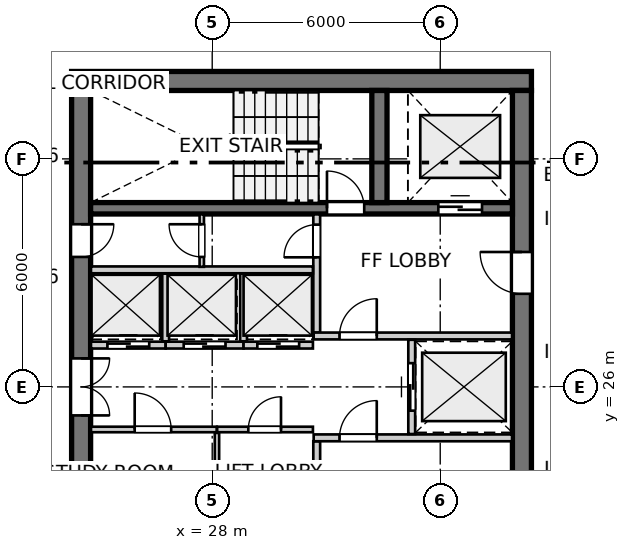
"""IFC4 building model, lengths in metres.
Left out: names, types, materials, properties, quantities, classifications, styles, units other than length and angle.
Written with IfcOpenShell. Run it as: python <this file> out.ifc"""

import sys

from ifc_helpers import new_model, si_unit, direction, frame, frame_2d, origin, place, context, subcontext, project, spatial, rectangle, extrude, source, transform, mapped, element, fill, save


model = new_model("IFC4")
c1 = context("Model", 3, precision=1e-05, world=origin(), true_north=direction((0.0, 1.0)))
c2 = subcontext(c1, "Body", "Model", "MODEL_VIEW")
j1 = project(units=[si_unit("LENGTHUNIT", "METRE"), si_unit("PLANEANGLEUNIT", "RADIAN")], contexts=[c1])
p1 = place(None, origin())
s1 = spatial("IfcSite", under=j1, at=p1, CompositionType="ELEMENT")
p2 = place(p1, origin())
s2 = spatial("IfcBuilding", under=s1, at=p2, CompositionType="ELEMENT")
p3 = place(p2, frame((0.0, 0.0, 211.6)))
s3 = spatial("IfcBuildingStorey", under=s2, at=p3, CompositionType="ELEMENT", Elevation=211.6)
p4 = place(p3, frame((36.4, 34.05, 0.0), z_axis=(0.0, 0.0, 1.0), x_axis=(-1.0, 0.0, 0.0)))
e1 = element("IfcWall", 1, at=p4, inside=s3, PredefinedType="SHEAR", context=c2, shape_type="SweptSolid", body=[
    extrude(rectangle(XDim=12.1, YDim=0.5, at=frame_2d((6.05, 0.0))), origin(), (0.0, 0.0, 1.0), 2.96),
])
p5 = place(p3, frame((24.55, 33.8, 0.0), z_axis=(0.0, 0.0, 1.0), x_axis=(0.0, -1.0, 0.0)))
e2 = element("IfcWall", 2, at=p5, inside=s3, PredefinedType="SHEAR", context=c2, shape_type="SweptSolid", body=[
    extrude(rectangle(XDim=15.6, YDim=0.5, at=frame_2d((7.8, 0.0))), origin(), (0.0, 0.0, 1.0), 2.96),
])
p6 = place(p5, frame((7.05, 0.0, 0.0)))
e3 = element("IfcOpeningElement", 3, at=p6, cuts=e2, PredefinedType="OPENING", context=c2, shape_type="SweptSolid", body=[
    extrude(rectangle(XDim=1.5, YDim=2.15, at=frame_2d((0.75, 1.075))), frame((0.0, 0.26, 0.0), z_axis=(0.0, -1.0, 0.0), x_axis=(1.0, 0.0, 0.0)), (0.0, 0.0, 1.0), 0.52),
])
p7 = place(p5, frame((3.52, 0.0, 0.0)))
e4 = element("IfcOpeningElement", 4, at=p7, cuts=e2, PredefinedType="OPENING", context=c2, shape_type="SweptSolid", body=[
    extrude(rectangle(XDim=0.86, YDim=2.05, at=frame_2d((0.43, 1.025))), frame((0.0, 0.26, 0.0), z_axis=(0.0, -1.0, 0.0), x_axis=(1.0, 0.0, 0.0)), (0.0, 0.0, 1.0), 0.52),
])
p8 = place(p5, frame((11.22, 0.0, 0.0)))
e5 = element("IfcOpeningElement", 5, at=p8, cuts=e2, PredefinedType="OPENING", context=c2, shape_type="SweptSolid", body=[
    extrude(rectangle(XDim=0.86, YDim=2.05, at=frame_2d((0.43, 1.025))), frame((0.0, 0.26, 0.0), z_axis=(0.0, -1.0, 0.0), x_axis=(1.0, 0.0, 0.0)), (0.0, 0.0, 1.0), 0.52),
])
p9 = place(p3, frame((36.15, 18.2, 0.0), z_axis=(0.0, 0.0, 1.0), x_axis=(0.0, 1.0, 0.0)))
e6 = element("IfcWall", 6, at=p9, inside=s3, PredefinedType="SHEAR", context=c2, shape_type="SweptSolid", body=[
    extrude(rectangle(XDim=15.6, YDim=0.5, at=frame_2d((7.8, 0.0))), origin(), (0.0, 0.0, 1.0), 2.96),
])
p10 = place(p9, frame((4.25, 0.0, 0.0)))
e7 = element("IfcOpeningElement", 7, at=p10, cuts=e6, PredefinedType="OPENING", context=c2, shape_type="SweptSolid", body=[
    extrude(rectangle(XDim=1.1, YDim=2.15, at=frame_2d((0.55, 1.075))), frame((0.0, 0.26, 0.0), z_axis=(0.0, -1.0, 0.0), x_axis=(1.0, 0.0, 0.0)), (0.0, 0.0, 1.0), 0.52),
])
p11 = place(p9, frame((10.25, 0.0, 0.0)))
e8 = element("IfcOpeningElement", 8, at=p11, cuts=e6, PredefinedType="OPENING", context=c2, shape_type="SweptSolid", body=[
    extrude(rectangle(XDim=1.1, YDim=2.15, at=frame_2d((0.55, 1.075))), frame((0.0, 0.26, 0.0), z_axis=(0.0, -1.0, 0.0), x_axis=(1.0, 0.0, 0.0)), (0.0, 0.0, 1.0), 0.52),
])
p12 = place(p3, frame((24.8, 30.7, 0.0), z_axis=(0.0, 0.0, 1.0), x_axis=(1.0, 0.0, 0.0)))
e9 = element("IfcWall", 9, at=p12, inside=s3, PredefinedType="SHEAR", context=c2, shape_type="SweptSolid", body=[
    extrude(rectangle(XDim=11.1, YDim=0.3, at=frame_2d((5.55, 0.0))), origin(), (0.0, 0.0, 1.0), 2.96),
])
p13 = place(p12, frame((6.22, 0.0, 0.0)))
e10 = element("IfcOpeningElement", 10, at=p13, cuts=e9, PredefinedType="OPENING", context=c2, shape_type="SweptSolid", body=[
    extrude(rectangle(XDim=0.98, YDim=2.15, at=frame_2d((0.49, 1.075))), frame((0.0, 0.16, 0.0), z_axis=(0.0, -1.0, 0.0), x_axis=(1.0, 0.0, 0.0)), (0.0, 0.0, 1.0), 0.32),
])
p14 = place(p12, frame((9.15, 0.0, 0.0)))
e11 = element("IfcOpeningElement", 11, at=p14, cuts=e9, PredefinedType="OPENING", context=c2, shape_type="SweptSolid", body=[
    extrude(rectangle(XDim=1.15, YDim=2.15, at=frame_2d((0.575, 1.075))), frame((0.0, 0.16, 0.0), z_axis=(0.0, -1.0, 0.0), x_axis=(1.0, 0.0, 0.0)), (0.0, 0.0, 1.0), 0.32),
])
p15 = place(p3, frame((32.4, 30.85, 0.0), z_axis=(0.0, 0.0, 1.0), x_axis=(0.0, 1.0, 0.0)))
e12 = element("IfcWall", 12, at=p15, inside=s3, PredefinedType="SHEAR", context=c2, shape_type="SweptSolid", body=[
    extrude(rectangle(XDim=2.95, YDim=0.4, at=frame_2d((1.475, 0.0))), origin(), (0.0, 0.0, 1.0), 2.96),
])
p16 = place(p3, frame((30.75, 21.46, 0.0), z_axis=(0.0, 0.0, 1.0), x_axis=(0.0, 1.0, 0.0)))
e13 = element("IfcWall", 13, at=p16, inside=s3, PredefinedType="PARTITIONING", context=c2, shape_type="SweptSolid", body=[
    extrude(rectangle(XDim=3.11, YDim=0.18, at=frame_2d((1.555, 0.0))), origin(), (0.0, 0.0, 1.0), 2.96),
])
p17 = place(p16, frame((0.26, 0.0, 0.0)))
e14 = element("IfcOpeningElement", 14, at=p17, cuts=e13, PredefinedType="OPENING", context=c2, shape_type="SweptSolid", body=[
    extrude(rectangle(XDim=0.86, YDim=2.05, at=frame_2d((0.43, 1.025))), frame((0.0, 0.1, 0.0), z_axis=(0.0, -1.0, 0.0), x_axis=(1.0, 0.0, 0.0)), (0.0, 0.0, 1.0), 0.2),
])
p18 = place(p3, frame((30.67, 24.66, 0.0), z_axis=(0.0, 0.0, 1.0), x_axis=(1.0, 0.0, 0.0)))
e15 = element("IfcWall", 15, at=p18, inside=s3, PredefinedType="PARTITIONING", context=c2, shape_type="SweptSolid", body=[
    extrude(rectangle(XDim=5.22, YDim=0.18, at=frame_2d((2.61, 0.0))), origin(), (0.0, 0.0, 1.0), 2.96),
])
p19 = place(p18, frame((0.68, 0.0, 0.0)))
e16 = element("IfcOpeningElement", 16, at=p19, cuts=e15, PredefinedType="OPENING", context=c2, shape_type="SweptSolid", body=[
    extrude(rectangle(XDim=0.98, YDim=2.15, at=frame_2d((0.49, 1.075))), frame((0.0, 0.1, 0.0), z_axis=(0.0, -1.0, 0.0), x_axis=(1.0, 0.0, 0.0)), (0.0, 0.0, 1.0), 0.2),
])
p20 = place(p3, frame((30.75, 27.43, 0.0), z_axis=(0.0, 0.0, 1.0), x_axis=(0.0, 1.0, 0.0)))
e17 = element("IfcWall", 17, at=p20, inside=s3, PredefinedType="PARTITIONING", context=c2, shape_type="SweptSolid", body=[
    extrude(rectangle(XDim=3.11, YDim=0.18, at=frame_2d((1.555, 0.0))), origin(), (0.0, 0.0, 1.0), 2.96),
])
p21 = place(p20, frame((1.98, 0.0, 0.0)))
e18 = element("IfcOpeningElement", 18, at=p21, cuts=e17, PredefinedType="OPENING", context=c2, shape_type="SweptSolid", body=[
    extrude(rectangle(XDim=0.86, YDim=2.05, at=frame_2d((0.43, 1.025))), frame((0.0, 0.1, 0.0), z_axis=(0.0, -1.0, 0.0), x_axis=(1.0, 0.0, 0.0)), (0.0, 0.0, 1.0), 0.2),
])
p22 = place(p3, frame((30.67, 27.34, 0.0), z_axis=(0.0, 0.0, 1.0), x_axis=(1.0, 0.0, 0.0)))
e19 = element("IfcWall", 19, at=p22, inside=s3, PredefinedType="PARTITIONING", context=c2, shape_type="SweptSolid", body=[
    extrude(rectangle(XDim=5.22, YDim=0.18, at=frame_2d((2.61, 0.0))), origin(), (0.0, 0.0, 1.0), 2.96),
])
p23 = place(p22, frame((0.68, 0.0, 0.0)))
e20 = element("IfcOpeningElement", 20, at=p23, cuts=e19, PredefinedType="OPENING", context=c2, shape_type="SweptSolid", body=[
    extrude(rectangle(XDim=0.98, YDim=2.15, at=frame_2d((0.49, 1.075))), frame((0.0, 0.1, 0.0), z_axis=(0.0, -1.0, 0.0), x_axis=(1.0, 0.0, 0.0)), (0.0, 0.0, 1.0), 0.2),
])
p24 = place(p3, frame((33.25, 24.76, 0.0), z_axis=(0.0, 0.0, 1.0), x_axis=(0.0, 1.0, 0.0)))
e21 = element("IfcWall", 21, at=p24, inside=s3, PredefinedType="PARTITIONING", context=c2, shape_type="SweptSolid", body=[
    extrude(rectangle(XDim=2.48, YDim=0.18, at=frame_2d((1.24, 0.0))), origin(), (0.0, 0.0, 1.0), 2.96),
])
p25 = place(p24, frame((0.615, 0.0, 0.0)))
e22 = element("IfcOpeningElement", 22, at=p25, cuts=e21, PredefinedType="OPENING", context=c2, shape_type="SweptSolid", body=[
    extrude(rectangle(XDim=1.25, YDim=2.15, at=frame_2d((0.625, 1.075))), frame((0.0, 0.1, 0.0), z_axis=(0.0, -1.0, 0.0), x_axis=(1.0, 0.0, 0.0)), (0.0, 0.0, 1.0), 0.2),
])
p26 = place(p3, frame((24.81, 24.88, 0.0), z_axis=(0.0, 0.0, 1.0), x_axis=(1.0, 0.0, 0.0)))
e23 = element("IfcWall", 23, at=p26, inside=s3, PredefinedType="PARTITIONING", context=c2, shape_type="SweptSolid", body=[
    extrude(rectangle(XDim=3.31, YDim=0.145, at=frame_2d((1.655, 0.0))), origin(), (0.0, 0.0, 1.0), 2.96),
])
p27 = place(p26, frame((1.15, 0.0, 0.0)))
e24 = element("IfcOpeningElement", 24, at=p27, cuts=e23, PredefinedType="OPENING", context=c2, shape_type="SweptSolid", body=[
    extrude(rectangle(XDim=0.96, YDim=2.1, at=frame_2d((0.48, 1.05))), frame((0.0, 0.083, 0.0), z_axis=(0.0, -1.0, 0.0), x_axis=(1.0, 0.0, 0.0)), (0.0, 0.0, 1.0), 0.165),
])
p28 = place(p3, frame((28.13, 24.88, 0.0), z_axis=(0.0, 0.0, 1.0), x_axis=(1.0, 0.0, 0.0)))
e25 = element("IfcWall", 25, at=p28, inside=s3, PredefinedType="PARTITIONING", context=c2, shape_type="SweptSolid", body=[
    extrude(rectangle(XDim=2.52, YDim=0.145, at=frame_2d((1.26, 0.0))), origin(), (0.0, 0.0, 1.0), 2.96),
])
p29 = place(p28, frame((0.82, 0.0, 0.0)))
e26 = element("IfcOpeningElement", 26, at=p29, cuts=e25, PredefinedType="OPENING", context=c2, shape_type="SweptSolid", body=[
    extrude(rectangle(XDim=0.86, YDim=2.05, at=frame_2d((0.43, 1.025))), frame((0.0, 0.083, 0.0), z_axis=(0.0, -1.0, 0.0), x_axis=(1.0, 0.0, 0.0)), (0.0, 0.0, 1.0), 0.165),
])
p30 = place(p3, frame((28.125, 23.02, 0.0), z_axis=(0.0, 0.0, 1.0), x_axis=(0.0, 1.0, 0.0)))
e27 = element("IfcWall", 27, at=p30, inside=s3, PredefinedType="PARTITIONING", context=c2, shape_type="SweptSolid", body=[
    extrude(rectangle(XDim=1.77, YDim=0.115, at=frame_2d((0.885, 0.0))), origin(), (0.0, 0.0, 1.0), 2.96),
])
p31 = place(p3, frame((24.81, 29.08, 0.0), z_axis=(0.0, 0.0, 1.0), x_axis=(1.0, 0.0, 0.0)))
e28 = element("IfcWall", 28, at=p31, inside=s3, PredefinedType="PARTITIONING", context=c2, shape_type="SweptSolid", body=[
    extrude(rectangle(XDim=5.84, YDim=0.18, at=frame_2d((2.92, 0.0))), origin(), (0.0, 0.0, 1.0), 2.96),
])
p32 = place(p3, frame((24.81, 27.1, 0.0), z_axis=(0.0, 0.0, 1.0), x_axis=(1.0, 0.0, 0.0)))
e29 = element("IfcWall", 29, at=p32, inside=s3, PredefinedType="PARTITIONING", context=c2, shape_type="SweptSolid", body=[
    extrude(rectangle(XDim=1.965, YDim=0.18, at=frame_2d((0.982, 0.0))), origin(), (0.0, 0.0, 1.0), 2.96),
])
p33 = place(p32, frame((0.433, 0.0, 0.0)))
e30 = element("IfcOpeningElement", 30, at=p33, cuts=e29, PredefinedType="OPENING", context=c2, shape_type="SweptSolid", body=[
    extrude(rectangle(XDim=1.1, YDim=2.15, at=frame_2d((0.55, 1.075))), frame((0.0, 0.1, 0.0), z_axis=(0.0, -1.0, 0.0), x_axis=(1.0, 0.0, 0.0)), (0.0, 0.0, 1.0), 0.2),
])
p34 = place(p3, frame((26.775, 27.1, 0.0), z_axis=(0.0, 0.0, 1.0), x_axis=(1.0, 0.0, 0.0)))
e31 = element("IfcWall", 31, at=p34, inside=s3, PredefinedType="PARTITIONING", context=c2, shape_type="SweptSolid", body=[
    extrude(rectangle(XDim=2.05, YDim=0.18, at=frame_2d((1.025, 0.0))), origin(), (0.0, 0.0, 1.0), 2.96),
])
p35 = place(p34, frame((0.475, 0.0, 0.0)))
e32 = element("IfcOpeningElement", 32, at=p35, cuts=e31, PredefinedType="OPENING", context=c2, shape_type="SweptSolid", body=[
    extrude(rectangle(XDim=1.1, YDim=2.15, at=frame_2d((0.55, 1.075))), frame((0.0, 0.1, 0.0), z_axis=(0.0, -1.0, 0.0), x_axis=(1.0, 0.0, 0.0)), (0.0, 0.0, 1.0), 0.2),
])
p36 = place(p3, frame((26.775, 27.2, 0.0), z_axis=(0.0, 0.0, 1.0), x_axis=(0.0, 1.0, 0.0)))
e33 = element("IfcWall", 33, at=p36, inside=s3, PredefinedType="PARTITIONING", context=c2, shape_type="SweptSolid", body=[
    extrude(rectangle(XDim=1.78, YDim=0.18, at=frame_2d((0.89, 0.0))), origin(), (0.0, 0.0, 1.0), 2.96),
])
p37 = place(p3, frame((28.825, 27.1, 0.0), z_axis=(0.0, 0.0, 1.0), x_axis=(1.0, 0.0, 0.0)))
e34 = element("IfcWall", 34, at=p37, inside=s3, PredefinedType="PARTITIONING", context=c2, shape_type="SweptSolid", body=[
    extrude(rectangle(XDim=1.825, YDim=0.18, at=frame_2d((0.913, 0.0))), origin(), (0.0, 0.0, 1.0), 2.96),
])
p38 = place(p37, frame((0.363, 0.0, 0.0)))
e35 = element("IfcOpeningElement", 35, at=p38, cuts=e34, PredefinedType="OPENING", context=c2, shape_type="SweptSolid", body=[
    extrude(rectangle(XDim=1.1, YDim=2.15, at=frame_2d((0.55, 1.075))), frame((0.0, 0.1, 0.0), z_axis=(0.0, -1.0, 0.0), x_axis=(1.0, 0.0, 0.0)), (0.0, 0.0, 1.0), 0.2),
])
p39 = place(p3, frame((28.825, 27.2, 0.0), z_axis=(0.0, 0.0, 1.0), x_axis=(0.0, 1.0, 0.0)))
e36 = element("IfcWall", 36, at=p39, inside=s3, PredefinedType="PARTITIONING", context=c2, shape_type="SweptSolid", body=[
    extrude(rectangle(XDim=1.78, YDim=0.18, at=frame_2d((0.89, 0.0))), origin(), (0.0, 0.0, 1.0), 2.96),
])
p40 = place(p3, frame((27.725, 29.16, 0.0), z_axis=(0.0, 0.0, 1.0), x_axis=(0.0, 1.0, 0.0)))
e37 = element("IfcWall", 37, at=p40, inside=s3, PredefinedType="PARTITIONING", context=c2, shape_type="SweptSolid", body=[
    extrude(rectangle(XDim=1.38, YDim=0.115, at=frame_2d((0.69, 0.0))), origin(), (0.0, 0.0, 1.0), 2.96),
])
p41 = place(p40, frame((0.26, 0.0, 0.0)))
e38 = element("IfcOpeningElement", 38, at=p41, cuts=e37, PredefinedType="OPENING", context=c2, shape_type="SweptSolid", body=[
    extrude(rectangle(XDim=0.86, YDim=2.05, at=frame_2d((0.43, 1.025))), frame((0.0, 0.067, 0.0), z_axis=(0.0, -1.0, 0.0), x_axis=(1.0, 0.0, 0.0)), (0.0, 0.0, 1.0), 0.135),
])
m1 = source(origin(), c2, "Body", "SweptSolid", [
    extrude(rectangle(XDim=0.98, YDim=2.15, at=frame_2d((0.49, 1.075))), frame((0.0, 0.025, 0.0), z_axis=(0.0, -1.0, 0.0), x_axis=(1.0, 0.0, 0.0)), (0.0, 0.0, 1.0), 0.05),
])
p42 = place(p13, origin())
e39 = element("IfcDoor", 39, at=p42, inside=s3, OperationType="SINGLE_SWING_LEFT", PredefinedType="DOOR", context=c2, shape_type="MappedRepresentation", body=[
    mapped(m1, transform((0.0, 0.0, 0.0), x_axis=(1.0, 0.0, 0.0), y_axis=(0.0, 1.0, 0.0), z_axis=(0.0, 0.0, 1.0), scale=1.0)),
])
fill(e10, e39)
m2 = source(origin(), c2, "Body", "SweptSolid", [
    extrude(rectangle(XDim=1.15, YDim=2.15, at=frame_2d((0.575, 1.075))), frame((0.0, 0.025, 0.0), z_axis=(0.0, -1.0, 0.0), x_axis=(1.0, 0.0, 0.0)), (0.0, 0.0, 1.0), 0.05),
])
p43 = place(p14, origin())
e40 = element("IfcDoor", 40, at=p43, inside=s3, OperationType="DOUBLE_DOOR_SLIDING", PredefinedType="DOOR", context=c2, shape_type="MappedRepresentation", body=[
    mapped(m2, transform((0.0, 0.0, 0.0), x_axis=(1.0, 0.0, 0.0), y_axis=(0.0, 1.0, 0.0), z_axis=(0.0, 0.0, 1.0), scale=1.0)),
])
fill(e11, e40)
m3 = source(origin(), c2, "Body", "SweptSolid", [
    extrude(rectangle(XDim=1.1, YDim=2.15, at=frame_2d((0.55, 1.075))), frame((0.0, 0.025, 0.0), z_axis=(0.0, -1.0, 0.0), x_axis=(1.0, 0.0, 0.0)), (0.0, 0.0, 1.0), 0.05),
])
p44 = place(p11, origin())
e41 = element("IfcDoor", 41, at=p44, inside=s3, OperationType="SINGLE_SWING_RIGHT", PredefinedType="DOOR", context=c2, shape_type="MappedRepresentation", body=[
    mapped(m3, transform((0.0, 0.0, 0.0), x_axis=(1.0, 0.0, 0.0), y_axis=(0.0, 1.0, 0.0), z_axis=(0.0, 0.0, 1.0), scale=1.0)),
])
fill(e8, e41)
m4 = source(origin(), c2, "Body", "SweptSolid", [
    extrude(rectangle(XDim=1.5, YDim=2.15, at=frame_2d((0.75, 1.075))), frame((0.0, 0.025, 0.0), z_axis=(0.0, -1.0, 0.0), x_axis=(1.0, 0.0, 0.0)), (0.0, 0.0, 1.0), 0.05),
])
p45 = place(p6, origin())
e42 = element("IfcDoor", 42, at=p45, inside=s3, OperationType="DOUBLE_DOOR_SINGLE_SWING", PredefinedType="DOOR", context=c2, shape_type="MappedRepresentation", body=[
    mapped(m4, transform((0.0, 0.0, 0.0), x_axis=(1.0, 0.0, 0.0), y_axis=(0.0, 1.0, 0.0), z_axis=(0.0, 0.0, 1.0), scale=1.0)),
])
fill(e3, e42)
m5 = source(origin(), c2, "Body", "SweptSolid", [
    extrude(rectangle(XDim=0.86, YDim=2.05, at=frame_2d((0.43, 1.025))), frame((0.0, 0.025, 0.0), z_axis=(0.0, -1.0, 0.0), x_axis=(1.0, 0.0, 0.0)), (0.0, 0.0, 1.0), 0.05),
])
p46 = place(p7, origin())
e43 = element("IfcDoor", 43, at=p46, inside=s3, OperationType="SINGLE_SWING_LEFT", PredefinedType="DOOR", context=c2, shape_type="MappedRepresentation", body=[
    mapped(m5, transform((0.0, 0.0, 0.0), x_axis=(1.0, 0.0, 0.0), y_axis=(0.0, 1.0, 0.0), z_axis=(0.0, 0.0, 1.0), scale=1.0)),
])
fill(e4, e43)
p47 = place(p19, origin())
e44 = element("IfcDoor", 44, at=p47, inside=s3, OperationType="SINGLE_SWING_RIGHT", PredefinedType="DOOR", context=c2, shape_type="MappedRepresentation", body=[
    mapped(m1, transform((0.0, 0.0, 0.0), x_axis=(1.0, 0.0, 0.0), y_axis=(0.0, 1.0, 0.0), z_axis=(0.0, 0.0, 1.0), scale=1.0)),
])
fill(e16, e44)
p48 = place(p21, origin())
e45 = element("IfcDoor", 45, at=p48, inside=s3, OperationType="SINGLE_SWING_LEFT", PredefinedType="DOOR", context=c2, shape_type="MappedRepresentation", body=[
    mapped(m5, transform((0.0, 0.0, 0.0), x_axis=(1.0, 0.0, 0.0), y_axis=(0.0, 1.0, 0.0), z_axis=(0.0, 0.0, 1.0), scale=1.0)),
])
fill(e18, e45)
p49 = place(p23, origin())
e46 = element("IfcDoor", 46, at=p49, inside=s3, OperationType="SINGLE_SWING_RIGHT", PredefinedType="DOOR", context=c2, shape_type="MappedRepresentation", body=[
    mapped(m1, transform((0.0, 0.0, 0.0), x_axis=(1.0, 0.0, 0.0), y_axis=(0.0, 1.0, 0.0), z_axis=(0.0, 0.0, 1.0), scale=1.0)),
])
fill(e20, e46)
m6 = source(origin(), c2, "Body", "SweptSolid", [
    extrude(rectangle(XDim=1.25, YDim=2.15, at=frame_2d((0.625, 1.075))), frame((0.0, 0.025, 0.0), z_axis=(0.0, -1.0, 0.0), x_axis=(1.0, 0.0, 0.0)), (0.0, 0.0, 1.0), 0.05),
])
p50 = place(p25, origin())
e47 = element("IfcDoor", 47, at=p50, inside=s3, OperationType="DOUBLE_DOOR_SLIDING", PredefinedType="DOOR", context=c2, shape_type="MappedRepresentation", body=[
    mapped(m6, transform((0.0, 0.0, 0.0), x_axis=(1.0, 0.0, 0.0), y_axis=(0.0, 1.0, 0.0), z_axis=(0.0, 0.0, 1.0), scale=1.0)),
])
fill(e22, e47)
m7 = source(origin(), c2, "Body", "SweptSolid", [
    extrude(rectangle(XDim=0.96, YDim=2.1, at=frame_2d((0.48, 1.05))), frame((0.0, 0.025, 0.0), z_axis=(0.0, -1.0, 0.0), x_axis=(1.0, 0.0, 0.0)), (0.0, 0.0, 1.0), 0.05),
])
p51 = place(p27, origin())
e48 = element("IfcDoor", 48, at=p51, inside=s3, OperationType="SINGLE_SWING_LEFT", PredefinedType="DOOR", context=c2, shape_type="MappedRepresentation", body=[
    mapped(m7, transform((0.0, 0.0, 0.0), x_axis=(1.0, 0.0, 0.0), y_axis=(0.0, 1.0, 0.0), z_axis=(0.0, 0.0, 1.0), scale=1.0)),
])
fill(e24, e48)
p52 = place(p29, origin())
e49 = element("IfcDoor", 49, at=p52, inside=s3, OperationType="SINGLE_SWING_RIGHT", PredefinedType="DOOR", context=c2, shape_type="MappedRepresentation", body=[
    mapped(m5, transform((0.0, 0.0, 0.0), x_axis=(1.0, 0.0, 0.0), y_axis=(0.0, 1.0, 0.0), z_axis=(0.0, 0.0, 1.0), scale=1.0)),
])
fill(e26, e49)
p53 = place(p33, origin())
e50 = element("IfcDoor", 50, at=p53, inside=s3, OperationType="DOUBLE_DOOR_SLIDING", PredefinedType="DOOR", context=c2, shape_type="MappedRepresentation", body=[
    mapped(m3, transform((0.0, 0.0, 0.0), x_axis=(1.0, 0.0, 0.0), y_axis=(0.0, 1.0, 0.0), z_axis=(0.0, 0.0, 1.0), scale=1.0)),
])
fill(e30, e50)
p54 = place(p35, origin())
e51 = element("IfcDoor", 51, at=p54, inside=s3, OperationType="DOUBLE_DOOR_SLIDING", PredefinedType="DOOR", context=c2, shape_type="MappedRepresentation", body=[
    mapped(m3, transform((0.0, 0.0, 0.0), x_axis=(1.0, 0.0, 0.0), y_axis=(0.0, 1.0, 0.0), z_axis=(0.0, 0.0, 1.0), scale=1.0)),
])
fill(e32, e51)
p55 = place(p38, origin())
e52 = element("IfcDoor", 52, at=p55, inside=s3, OperationType="DOUBLE_DOOR_SLIDING", PredefinedType="DOOR", context=c2, shape_type="MappedRepresentation", body=[
    mapped(m3, transform((0.0, 0.0, 0.0), x_axis=(1.0, 0.0, 0.0), y_axis=(0.0, 1.0, 0.0), z_axis=(0.0, 0.0, 1.0), scale=1.0)),
])
fill(e35, e52)
p56 = place(p41, origin())
e53 = element("IfcDoor", 53, at=p56, inside=s3, OperationType="SINGLE_SWING_RIGHT", PredefinedType="DOOR", context=c2, shape_type="MappedRepresentation", body=[
    mapped(m5, transform((0.0, 0.0, 0.0), x_axis=(1.0, 0.0, 0.0), y_axis=(0.0, 1.0, 0.0), z_axis=(0.0, 0.0, 1.0), scale=1.0)),
])
fill(e38, e53)
save(model, sys.argv[1])
